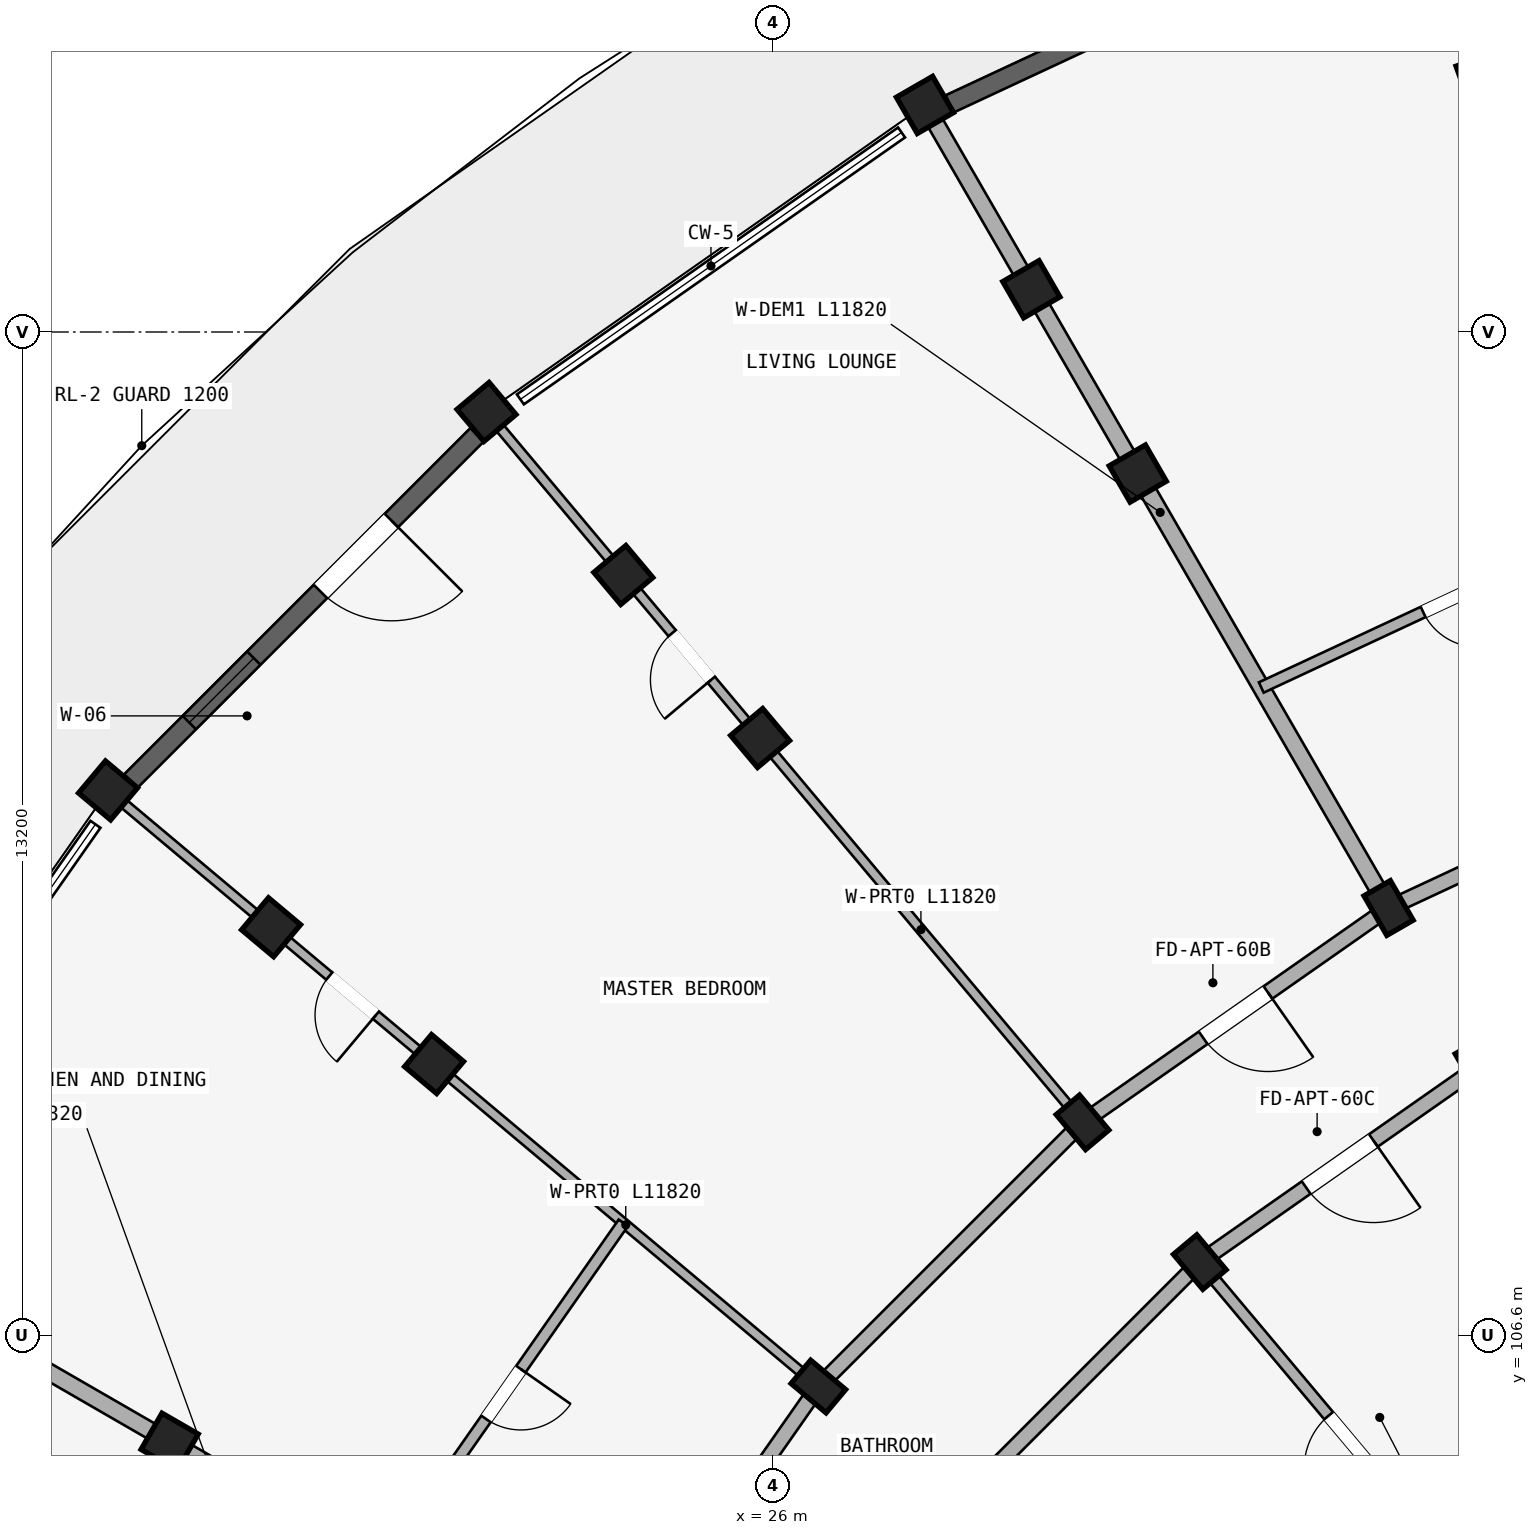
"""IFC4 building model, lengths in metres.
Left out: names, types, materials, properties, quantities, classifications, styles, units other than length and angle.
Written with IfcOpenShell. Run it as: python <this file> out.ifc"""

import sys

from ifc_helpers import new_model, si_unit, direction, frame, frame_2d, origin, origin_2d, place, context, subcontext, project, spatial, rectangle, extrude, element, fill, save


model = new_model("IFC4")
c1 = context("Model", 3, precision=1e-05, world=origin(), true_north=direction((0.0, 1.0)))
c2 = subcontext(c1, "Body", "Model", "MODEL_VIEW")
j1 = project(units=[si_unit("LENGTHUNIT", "METRE"), si_unit("PLANEANGLEUNIT", "RADIAN")], contexts=[c1])
p1 = place(None, origin())
s1 = spatial("IfcSite", under=j1, at=p1, CompositionType="ELEMENT")
p2 = place(p1, origin())
s2 = spatial("IfcBuilding", under=s1, at=p2, CompositionType="ELEMENT")
p3 = place(p2, frame((0.0, 0.0, 43.35)))
s3 = spatial("IfcBuildingStorey", under=s2, at=p3, CompositionType="ELEMENT", Elevation=43.35)
p4 = place(p3, frame((35.34, 123.132, 0.0), z_axis=(0.0, 0.0, 1.0), x_axis=(0.939692620786, 0.342020143326, 0.0)))
e1 = element("IfcColumn", 1, at=p4, inside=s3, PredefinedType="COLUMN", context=c2, shape_type="SweptSolid", body=[
    extrude(rectangle(XDim=0.55, YDim=0.55, at=origin_2d()), origin(), (0.0, 0.0, 1.0), 2.93),
])
for number, where, z_axis, x_axis in (
    (2, (35.3, 110.144, 0.0), (0.0, 0.0, 1.0), (0.866, 0.5, 0.0)),
    (3, (34.1, 112.222, 0.0), (0.0, 0.0, 1.0), (0.866, 0.5, 0.0)),
):
    element("IfcColumn", number, at=place(p3, frame(where, z_axis=z_axis, x_axis=x_axis)), inside=s3, PredefinedType="COLUMN", context=c2, shape_type="SweptSolid", body=[
        extrude(rectangle(XDim=0.4, YDim=0.6, at=origin_2d()), origin(), (0.0, 0.0, 1.0), 2.93),
    ])
for number, where, z_axis, x_axis in (
    (4, (30.8, 117.938, 0.0), (0.0, 0.0, 1.0), (0.866, 0.5, 0.0)),
    (5, (29.4, 120.363, 0.0), (0.0, 0.0, 1.0), (0.866, 0.5, 0.0)),
):
    element("IfcColumn", number, at=place(p3, frame(where, z_axis=z_axis, x_axis=x_axis)), inside=s3, PredefinedType="COLUMN", context=c2, shape_type="SweptSolid", body=[
        extrude(rectangle(XDim=0.55, YDim=0.55, at=origin_2d()), origin(), (0.0, 0.0, 1.0), 2.93),
    ])
p5 = place(p3, frame((28.0, 122.787, 0.0), z_axis=(0.0, 0.0, 1.0), x_axis=(0.866025403784, 0.5, 0.0)))
e6 = element("IfcColumn", 6, at=p5, inside=s3, PredefinedType="COLUMN", context=c2, shape_type="SweptSolid", body=[
    extrude(rectangle(XDim=0.55, YDim=0.55, at=origin_2d()), origin(), (0.0, 0.0, 1.0), 2.97),
])
for number, where, z_axis, x_axis in (
    (7, (31.616, 107.564, 0.0), (0.0, 0.0, 1.0), (0.766, 0.643, 0.0)),
    (8, (30.073, 109.402, 0.0), (0.0, 0.0, 1.0), (0.766, 0.643, 0.0)),
):
    element("IfcColumn", number, at=place(p3, frame(where, z_axis=z_axis, x_axis=x_axis)), inside=s3, PredefinedType="COLUMN", context=c2, shape_type="SweptSolid", body=[
        extrude(rectangle(XDim=0.4, YDim=0.6, at=origin_2d()), origin(), (0.0, 0.0, 1.0), 2.93),
    ])
for number, where, z_axis, x_axis in (
    (9, (25.831, 114.458, 0.0), (0.0, 0.0, 1.0), (0.766, 0.643, 0.0)),
    (10, (24.031, 116.603, 0.0), (0.0, 0.0, 1.0), (0.766, 0.643, 0.0)),
):
    element("IfcColumn", number, at=place(p3, frame(where, z_axis=z_axis, x_axis=x_axis)), inside=s3, PredefinedType="COLUMN", context=c2, shape_type="SweptSolid", body=[
        extrude(rectangle(XDim=0.55, YDim=0.55, at=origin_2d()), origin(), (0.0, 0.0, 1.0), 2.93),
    ])
p6 = place(p3, frame((22.231, 118.748, 0.0), z_axis=(0.0, 0.0, 1.0), x_axis=(0.766044443119, 0.642787609687, 0.0)))
e11 = element("IfcColumn", 11, at=p6, inside=s3, PredefinedType="COLUMN", context=c2, shape_type="SweptSolid", body=[
    extrude(rectangle(XDim=0.55, YDim=0.55, at=origin_2d()), origin(), (0.0, 0.0, 1.0), 2.97),
])
p7 = place(p3, frame((26.598, 105.927, 0.0), z_axis=(0.0, 0.0, 1.0), x_axis=(0.642787609687, 0.766044443119, 0.0)))
e12 = element("IfcColumn", 12, at=p7, inside=s3, PredefinedType="COLUMN", context=c2, shape_type="SweptSolid", body=[
    extrude(rectangle(XDim=0.4, YDim=0.6, at=origin_2d()), origin(), (0.0, 0.0, 1.0), 2.93),
])
for number, where, z_axis, x_axis in (
    (13, (21.542, 110.169, 0.0), (0.0, 0.0, 1.0), (0.643, 0.766, 0.0)),
    (14, (19.397, 111.969, 0.0), (0.0, 0.0, 1.0), (0.643, 0.766, 0.0)),
):
    element("IfcColumn", number, at=place(p3, frame(where, z_axis=z_axis, x_axis=x_axis)), inside=s3, PredefinedType="COLUMN", context=c2, shape_type="SweptSolid", body=[
        extrude(rectangle(XDim=0.55, YDim=0.55, at=origin_2d()), origin(), (0.0, 0.0, 1.0), 2.93),
    ])
p8 = place(p3, frame((17.252, 113.769, 0.0), z_axis=(0.0, 0.0, 1.0), x_axis=(0.642787609687, 0.766044443119, 0.0)))
e15 = element("IfcColumn", 15, at=p8, inside=s3, PredefinedType="COLUMN", context=c2, shape_type="SweptSolid", body=[
    extrude(rectangle(XDim=0.55, YDim=0.55, at=origin_2d()), origin(), (0.0, 0.0, 1.0), 2.97),
])
p9 = place(p3, frame((18.062, 105.2, 0.0), z_axis=(0.0, 0.0, 1.0), x_axis=(0.5, 0.866025403784, 0.0)))
e16 = element("IfcColumn", 16, at=p9, inside=s3, PredefinedType="COLUMN", context=c2, shape_type="SweptSolid", body=[
    extrude(rectangle(XDim=0.55, YDim=0.55, at=origin_2d()), origin(), (0.0, 0.0, 1.0), 2.93),
])
p10 = place(p3, frame((38.555, 114.299, 0.0), z_axis=(0.0, 0.0, 1.0), x_axis=(-0.906302381024, -0.422629854778, 0.0)))
e17 = element("IfcWall", 17, at=p10, inside=s3, PredefinedType="STANDARD", context=c2, shape_type="SweptSolid", body=[
    extrude(rectangle(XDim=4.915, YDim=0.2, at=frame_2d((2.458, 0.0))), origin(), (0.0, 0.0, 1.0), 2.372),
])
p11 = place(p3, frame((35.3, 110.144, 0.0), z_axis=(0.0, 0.0, 1.0), x_axis=(-0.819155404658, -0.573571637217, 0.0)))
e18 = element("IfcWall", 18, at=p11, inside=s3, PredefinedType="STANDARD", context=c2, shape_type="SweptSolid", body=[
    extrude(rectangle(XDim=4.497, YDim=0.2, at=frame_2d((2.249, 0.0))), origin(), (0.0, 0.0, 1.0), 2.372),
])
p12 = place(p11, frame((1.709, 0.0, 0.0)))
e19 = element("IfcOpeningElement", 19, at=p12, cuts=e18, PredefinedType="OPENING", context=c2, shape_type="SweptSolid", body=[
    extrude(rectangle(XDim=1.08, YDim=2.15, at=frame_2d((0.54, 1.075))), frame((0.0, 0.11, 0.0), z_axis=(0.0, -1.0, 0.0), x_axis=(1.0, 0.0, 0.0)), (0.0, 0.0, 1.0), 0.22),
])
p13 = place(p3, frame((34.1, 112.222, 0.0), z_axis=(0.0, 0.0, 1.0), x_axis=(-0.819140911474, -0.573592335331, 0.0)))
e20 = element("IfcWall", 20, at=p13, inside=s3, PredefinedType="STANDARD", context=c2, shape_type="SweptSolid", body=[
    extrude(rectangle(XDim=4.916, YDim=0.2, at=frame_2d((2.458, 0.0))), origin(), (0.0, 0.0, 1.0), 2.372),
])
p14 = place(p13, frame((1.938, 0.0, 0.0)))
e21 = element("IfcOpeningElement", 21, at=p14, cuts=e20, PredefinedType="OPENING", context=c2, shape_type="SweptSolid", body=[
    extrude(rectangle(XDim=1.04, YDim=2.15, at=frame_2d((0.52, 1.075))), frame((0.0, 0.11, 0.0), z_axis=(0.0, -1.0, 0.0), x_axis=(1.0, 0.0, 0.0)), (0.0, 0.0, 1.0), 0.22),
])
p15 = place(p3, frame((31.616, 107.564, 0.0), z_axis=(0.0, 0.0, 1.0), x_axis=(-0.707106781187, -0.707106781187, 0.0)))
e22 = element("IfcWall", 22, at=p15, inside=s3, PredefinedType="STANDARD", context=c2, shape_type="SweptSolid", body=[
    extrude(rectangle(XDim=4.497, YDim=0.2, at=frame_2d((2.249, 0.0))), origin(), (0.0, 0.0, 1.0), 2.372),
])
p16 = place(p3, frame((30.073, 109.402, 0.0), z_axis=(0.0, 0.0, 1.0), x_axis=(-0.707106781187, -0.707106781187, 0.0)))
e23 = element("IfcWall", 23, at=p16, inside=s3, PredefinedType="STANDARD", context=c2, shape_type="SweptSolid", body=[
    extrude(rectangle(XDim=4.916, YDim=0.2, at=frame_2d((2.458, 0.0))), origin(), (0.0, 0.0, 1.0), 2.372),
])
p17 = place(p3, frame((26.598, 105.927, 0.0), z_axis=(0.0, 0.0, 1.0), x_axis=(-0.573592335331, -0.819140911474, 0.0)))
e24 = element("IfcWall", 24, at=p17, inside=s3, PredefinedType="STANDARD", context=c2, shape_type="SweptSolid", body=[
    extrude(rectangle(XDim=4.916, YDim=0.2, at=frame_2d((2.458, 0.0))), origin(), (0.0, 0.0, 1.0), 2.372),
])
p18 = place(p3, frame((38.521, 114.393, 0.0), z_axis=(0.0, 0.0, 1.0), x_axis=(-0.342005081534, 0.939698102693, 0.0)))
e25 = element("IfcWall", 25, at=p18, inside=s3, PredefinedType="PARTITIONING", context=c2, shape_type="SweptSolid", body=[
    extrude(rectangle(XDim=11.82, YDim=0.125, at=frame_2d((5.91, 0.0))), origin(), (0.0, 0.0, 1.0), 2.372),
])
p19 = place(p18, frame((7.5, 0.0, 0.0)))
e26 = element("IfcOpeningElement", 26, at=p19, cuts=e25, PredefinedType="OPENING", context=c2, shape_type="SweptSolid", body=[
    extrude(rectangle(XDim=0.8, YDim=2.1, at=frame_2d((0.4, 1.05))), frame((0.0, 0.073, 0.0), z_axis=(0.0, -1.0, 0.0), x_axis=(1.0, 0.0, 0.0)), (0.0, 0.0, 1.0), 0.145),
])
p20 = place(p3, frame((34.05, 112.309, 0.0), z_axis=(0.0, 0.0, 1.0), x_axis=(-0.500013290014, 0.866017730655, 0.0)))
e27 = element("IfcWall", 27, at=p20, inside=s3, PredefinedType="STANDARD", context=c2, shape_type="SweptSolid", body=[
    extrude(rectangle(XDim=11.82, YDim=0.22, at=frame_2d((5.91, 0.0))), origin(), (0.0, 0.0, 1.0), 2.372),
])
p21 = place(p3, frame((35.987, 102.355, 0.0), z_axis=(0.0, 0.0, 1.0), x_axis=(-0.642784846501, 0.766046761698, 0.0)))
e28 = element("IfcWall", 28, at=p21, inside=s3, PredefinedType="PARTITIONING", context=c2, shape_type="SweptSolid", body=[
    extrude(rectangle(XDim=6.75, YDim=0.15, at=frame_2d((3.375, 0.0))), origin(), (0.0, 0.0, 1.0), 2.372),
])
p22 = place(p21, frame((3.262, 0.0, 0.0)))
e29 = element("IfcOpeningElement", 29, at=p22, cuts=e28, PredefinedType="OPENING", context=c2, shape_type="SweptSolid", body=[
    extrude(rectangle(XDim=0.9, YDim=2.1, at=frame_2d((0.45, 1.05))), frame((0.0, 0.085, 0.0), z_axis=(0.0, -1.0, 0.0), x_axis=(1.0, 0.0, 0.0)), (0.0, 0.0, 1.0), 0.17),
])
p23 = place(p3, frame((30.009, 109.479, 0.0), z_axis=(0.0, 0.0, 1.0), x_axis=(-0.642781220531, 0.766049804211, 0.0)))
e30 = element("IfcWall", 30, at=p23, inside=s3, PredefinedType="PARTITIONING", context=c2, shape_type="SweptSolid", body=[
    extrude(rectangle(XDim=11.82, YDim=0.125, at=frame_2d((5.91, 0.0))), origin(), (0.0, 0.0, 1.0), 2.372),
])
p24 = place(p23, frame((7.5, 0.0, 0.0)))
e31 = element("IfcOpeningElement", 31, at=p24, cuts=e30, PredefinedType="OPENING", context=c2, shape_type="SweptSolid", body=[
    extrude(rectangle(XDim=0.8, YDim=2.1, at=frame_2d((0.4, 1.05))), frame((0.0, 0.073, 0.0), z_axis=(0.0, -1.0, 0.0), x_axis=(1.0, 0.0, 0.0)), (0.0, 0.0, 1.0), 0.145),
])
p25 = place(p3, frame((26.521, 105.991, 0.0), z_axis=(0.0, 0.0, 1.0), x_axis=(-0.766049804211, 0.642781220531, 0.0)))
e32 = element("IfcWall", 32, at=p25, inside=s3, PredefinedType="PARTITIONING", context=c2, shape_type="SweptSolid", body=[
    extrude(rectangle(XDim=11.82, YDim=0.125, at=frame_2d((5.91, 0.0))), origin(), (0.0, 0.0, 1.0), 2.372),
])
p26 = place(p25, frame((7.5, 0.0, 0.0)))
e33 = element("IfcOpeningElement", 33, at=p26, cuts=e32, PredefinedType="OPENING", context=c2, shape_type="SweptSolid", body=[
    extrude(rectangle(XDim=0.8, YDim=2.1, at=frame_2d((0.4, 1.05))), frame((0.0, 0.073, 0.0), z_axis=(0.0, -1.0, 0.0), x_axis=(1.0, 0.0, 0.0)), (0.0, 0.0, 1.0), 0.145),
])
p27 = place(p3, frame((23.691, 101.95, 0.0), z_axis=(0.0, 0.0, 1.0), x_axis=(-0.866017730655, 0.500013290014, 0.0)))
e34 = element("IfcWall", 34, at=p27, inside=s3, PredefinedType="STANDARD", context=c2, shape_type="SweptSolid", body=[
    extrude(rectangle(XDim=11.82, YDim=0.22, at=frame_2d((5.91, 0.0))), origin(), (0.0, 0.0, 1.0), 2.372),
])
p28 = place(p3, frame((37.409, 117.447, 0.0), z_axis=(0.0, 0.0, 1.0), x_axis=(-0.906302189986, -0.422630264446, 0.0)))
e35 = element("IfcWall", 35, at=p28, inside=s3, PredefinedType="PLUMBINGWALL", context=c2, shape_type="SweptSolid", body=[
    extrude(rectangle(XDim=5.5, YDim=0.15, at=frame_2d((2.75, 0.0))), origin(), (0.0, 0.0, 1.0), 2.372),
])
p29 = place(p28, frame((2.35, 0.0, 0.0)))
e36 = element("IfcOpeningElement", 36, at=p29, cuts=e35, PredefinedType="OPENING", context=c2, shape_type="SweptSolid", body=[
    extrude(rectangle(XDim=0.8, YDim=2.1, at=frame_2d((0.4, 1.05))), frame((0.0, 0.085, 0.0), z_axis=(0.0, -1.0, 0.0), x_axis=(1.0, 0.0, 0.0)), (0.0, 0.0, 1.0), 0.17),
])
p30 = place(p3, frame((24.031, 108.08, 0.0), z_axis=(0.0, 0.0, 1.0), x_axis=(-0.573569599955, -0.819156831143, 0.0)))
e37 = element("IfcWall", 37, at=p30, inside=s3, PredefinedType="PLUMBINGWALL", context=c2, shape_type="SweptSolid", body=[
    extrude(rectangle(XDim=5.5, YDim=0.15, at=frame_2d((2.75, 0.0))), origin(), (0.0, 0.0, 1.0), 2.372),
])
p31 = place(p30, frame((2.35, 0.0, 0.0)))
e38 = element("IfcOpeningElement", 38, at=p31, cuts=e37, PredefinedType="OPENING", context=c2, shape_type="SweptSolid", body=[
    extrude(rectangle(XDim=0.8, YDim=2.1, at=frame_2d((0.4, 1.05))), frame((0.0, 0.085, 0.0), z_axis=(0.0, -1.0, 0.0), x_axis=(1.0, 0.0, 0.0)), (0.0, 0.0, 1.0), 0.17),
])
p32 = place(p3, frame((34.163, 125.523, 0.0), z_axis=(0.0, 0.0, 1.0), x_axis=(-0.906320597547, -0.422590788426, 0.0)))
e39 = element("IfcWall", 39, at=p32, inside=s3, PredefinedType="STANDARD", context=c2, shape_type="SweptSolid", body=[
    extrude(rectangle(XDim=6.441, YDim=0.25, at=frame_2d((3.22, 0.0))), origin(), (0.0, 0.0, 1.0), 2.412),
])
p33 = place(p32, frame((2.121, 0.0, 0.312)))
e40 = element("IfcOpeningElement", 40, at=p33, cuts=e39, PredefinedType="OPENING", context=c2, shape_type="SweptSolid", body=[
    extrude(rectangle(XDim=2.2, YDim=1.9, at=frame_2d((1.1, 0.95))), frame((0.0, 0.135, 0.0), z_axis=(0.0, -1.0, 0.0), x_axis=(1.0, 0.0, 0.0)), (0.0, 0.0, 1.0), 0.27),
])
p34 = place(p3, frame((22.107, 118.447, 0.0), z_axis=(0.0, 0.0, 1.0), x_axis=(-0.707106781187, -0.707106781187, 0.0)))
e41 = element("IfcWall", 41, at=p34, inside=s3, PredefinedType="STANDARD", context=c2, shape_type="SweptSolid", body=[
    extrude(rectangle(XDim=6.441, YDim=0.25, at=frame_2d((3.22, 0.0))), origin(), (0.0, 0.0, 1.0), 2.412),
])
p35 = place(p34, frame((4.155, 0.0, 0.562)))
e42 = element("IfcOpeningElement", 42, at=p35, cuts=e41, PredefinedType="OPENING", context=c2, shape_type="SweptSolid", body=[
    extrude(rectangle(XDim=1.2, YDim=1.5, at=frame_2d((0.6, 0.75))), frame((0.0, 0.135, 0.0), z_axis=(0.0, -1.0, 0.0), x_axis=(1.0, 0.0, 0.0)), (0.0, 0.0, 1.0), 0.27),
])
p36 = place(p34, frame((1.594, 0.0, 0.0)))
e43 = element("IfcOpeningElement", 43, at=p36, cuts=e41, PredefinedType="OPENING", context=c2, shape_type="SweptSolid", body=[
    extrude(rectangle(XDim=1.32, YDim=2.15, at=frame_2d((0.66, 1.075))), frame((0.0, 0.135, 0.0), z_axis=(0.0, -1.0, 0.0), x_axis=(1.0, 0.0, 0.0)), (0.0, 0.0, 1.0), 0.27),
])
p37 = place(p35, origin())
e44 = element("IfcWindow", 44, at=p37, inside=s3, PartitioningType="SINGLE_PANEL", PredefinedType="WINDOW", context=c2, shape_type="SweptSolid", body=[
    extrude(rectangle(XDim=1.2, YDim=1.5, at=frame_2d((0.6, 0.75))), frame((0.0, 0.03, 0.0), z_axis=(0.0, -1.0, 0.0), x_axis=(1.0, 0.0, 0.0)), (0.0, 0.0, 1.0), 0.06),
])
fill(e42, e44)
p38 = place(p22, origin())
e45 = element("IfcDoor", 45, at=p38, inside=s3, OperationType="SINGLE_SWING_LEFT", PredefinedType="DOOR", context=c2, shape_type="SweptSolid", body=[
    extrude(rectangle(XDim=0.9, YDim=2.1, at=frame_2d((0.45, 1.05))), frame((0.0, 0.025, 0.0), z_axis=(0.0, -1.0, 0.0), x_axis=(1.0, 0.0, 0.0)), (0.0, 0.0, 1.0), 0.05),
])
fill(e29, e45)
p39 = place(p24, frame((0.8, 0.0, 0.0), z_axis=(0.0, 0.0, 1.0), x_axis=(-1.0, 0.0, 0.0)))
e46 = element("IfcDoor", 46, at=p39, inside=s3, OperationType="SINGLE_SWING_RIGHT", PredefinedType="DOOR", context=c2, shape_type="SweptSolid", body=[
    extrude(rectangle(XDim=0.8, YDim=2.1, at=frame_2d((0.4, 1.05))), frame((0.0, 0.025, 0.0), z_axis=(0.0, -1.0, 0.0), x_axis=(1.0, 0.0, 0.0)), (0.0, 0.0, 1.0), 0.05),
])
fill(e31, e46)
p40 = place(p26, frame((0.8, 0.0, 0.0), z_axis=(0.0, 0.0, 1.0), x_axis=(-1.0, 0.0, 0.0)))
e47 = element("IfcDoor", 47, at=p40, inside=s3, OperationType="SINGLE_SWING_RIGHT", PredefinedType="DOOR", context=c2, shape_type="SweptSolid", body=[
    extrude(rectangle(XDim=0.8, YDim=2.1, at=frame_2d((0.4, 1.05))), frame((0.0, 0.025, 0.0), z_axis=(0.0, -1.0, 0.0), x_axis=(1.0, 0.0, 0.0)), (0.0, 0.0, 1.0), 0.05),
])
fill(e33, e47)
p41 = place(p29, frame((0.8, 0.0, 0.0), z_axis=(0.0, 0.0, 1.0), x_axis=(-1.0, 0.0, 0.0)))
e48 = element("IfcDoor", 48, at=p41, inside=s3, OperationType="SINGLE_SWING_RIGHT", PredefinedType="DOOR", context=c2, shape_type="SweptSolid", body=[
    extrude(rectangle(XDim=0.8, YDim=2.1, at=frame_2d((0.4, 1.05))), frame((0.0, 0.025, 0.0), z_axis=(0.0, -1.0, 0.0), x_axis=(1.0, 0.0, 0.0)), (0.0, 0.0, 1.0), 0.05),
])
fill(e36, e48)
p42 = place(p14, origin())
e49 = element("IfcDoor", 49, at=p42, inside=s3, OperationType="SINGLE_SWING_LEFT", PredefinedType="DOOR", context=c2, shape_type="SweptSolid", body=[
    extrude(rectangle(XDim=1.04, YDim=2.15, at=frame_2d((0.52, 1.075))), frame((0.0, 0.025, 0.0), z_axis=(0.0, -1.0, 0.0), x_axis=(1.0, 0.0, 0.0)), (0.0, 0.0, 1.0), 0.05),
])
fill(e21, e49)
p43 = place(p31, frame((0.8, 0.0, 0.0), z_axis=(0.0, 0.0, 1.0), x_axis=(-1.0, 0.0, 0.0)))
e50 = element("IfcDoor", 50, at=p43, inside=s3, OperationType="SINGLE_SWING_RIGHT", PredefinedType="DOOR", context=c2, shape_type="SweptSolid", body=[
    extrude(rectangle(XDim=0.8, YDim=2.1, at=frame_2d((0.4, 1.05))), frame((0.0, 0.025, 0.0), z_axis=(0.0, -1.0, 0.0), x_axis=(1.0, 0.0, 0.0)), (0.0, 0.0, 1.0), 0.05),
])
fill(e38, e50)
p44 = place(p12, origin())
e51 = element("IfcDoor", 51, at=p44, inside=s3, OperationType="SINGLE_SWING_LEFT", PredefinedType="DOOR", context=c2, shape_type="SweptSolid", body=[
    extrude(rectangle(XDim=1.08, YDim=2.15, at=frame_2d((0.54, 1.075))), frame((0.0, 0.025, 0.0), z_axis=(0.0, -1.0, 0.0), x_axis=(1.0, 0.0, 0.0)), (0.0, 0.0, 1.0), 0.05),
])
fill(e19, e51)
p45 = place(p36, frame((1.32, 0.0, 0.0), z_axis=(0.0, 0.0, 1.0), x_axis=(-1.0, 0.0, 0.0)))
e52 = element("IfcDoor", 52, at=p45, inside=s3, OperationType="SINGLE_SWING_RIGHT", PredefinedType="DOOR", context=c2, shape_type="SweptSolid", body=[
    extrude(rectangle(XDim=1.32, YDim=2.15, at=frame_2d((0.66, 1.075))), frame((0.0, 0.025, 0.0), z_axis=(0.0, -1.0, 0.0), x_axis=(1.0, 0.0, 0.0)), (0.0, 0.0, 1.0), 0.05),
])
fill(e43, e52)
save(model, sys.argv[1])
